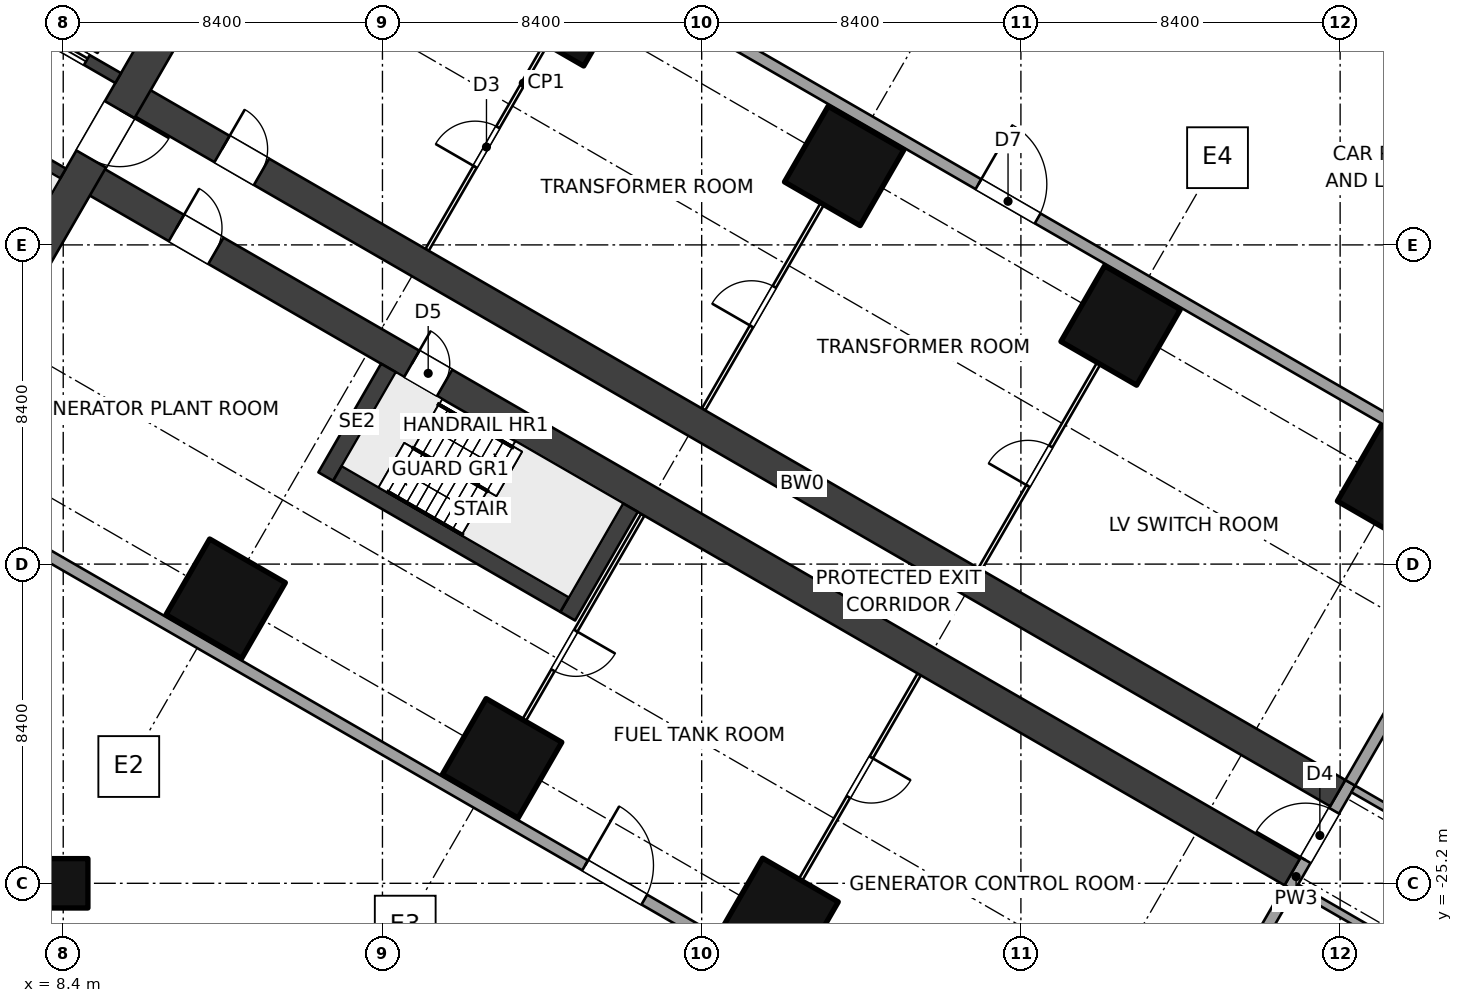
"""IFC4 building model, lengths in metres.
Left out: names, types, materials, properties, quantities, classifications, styles, units other than length and angle.
Written with IfcOpenShell. Run it as: python <this file> out.ifc"""

import sys

from ifc_helpers import new_model, si_unit, direction, frame, frame_2d, origin, origin_2d, place, context, subcontext, project, spatial, rectangle, extrude, element, fill, save


model = new_model("IFC4")
c1 = context("Model", 3, precision=1e-05, world=origin(), true_north=direction((0.0, 1.0)))
c2 = subcontext(c1, "Body", "Model", "MODEL_VIEW")
j1 = project(units=[si_unit("LENGTHUNIT", "METRE"), si_unit("PLANEANGLEUNIT", "RADIAN")], contexts=[c1])
p1 = place(None, origin())
s1 = spatial("IfcSite", under=j1, at=p1, CompositionType="ELEMENT")
p2 = place(p1, origin())
s2 = spatial("IfcBuilding", under=s1, at=p2, CompositionType="ELEMENT")
p3 = place(p2, origin())
s3 = spatial("IfcBuildingStorey", under=s2, at=p3, CompositionType="ELEMENT", Elevation=0.0)
for number, where, z_axis, x_axis in (
    (1, (21.675, -2.122, 0.0), (0.0, 0.0, 1.0), (-0.5, -0.866, 0.0)),
    (2, (12.675, -17.71, 0.0), (0.0, 0.0, 1.0), (-0.5, -0.866, 0.0)),
    (3, (28.949, -6.322, 0.0), (0.0, 0.0, 1.0), (-0.5, -0.866, 0.0)),
    (4, (19.949, -21.91, 0.0), (0.0, 0.0, 1.0), (-0.5, -0.866, 0.0)),
    (5, (36.224, -10.521, 0.0), (0.0, 0.0, 1.0), (-0.5, -0.866, 0.0)),
    (6, (27.224, -26.11, 0.0), (0.0, 0.0, 1.0), (-0.5, -0.866, 0.0)),
    (7, (43.499, -14.721, 0.0), (0.0, 0.0, 1.0), (-0.5, -0.866, 0.0)),
):
    element("IfcColumn", number, at=place(p3, frame(where, z_axis=z_axis, x_axis=x_axis)), inside=s3, PredefinedType="COLUMN", context=c2, shape_type="SweptSolid", body=[
        extrude(rectangle(XDim=2.3, YDim=2.3, at=origin_2d()), origin(), (0.0, 0.0, 1.0), 6.0),
    ])
p4 = place(p3, frame((8.4, -25.2, 0.0), z_axis=(0.0, 0.0, 1.0), x_axis=(1.0, 0.0, 0.0)))
e8 = element("IfcColumn", 8, at=p4, inside=s3, PredefinedType="COLUMN", context=c2, shape_type="SweptSolid", body=[
    extrude(rectangle(XDim=1.3, YDim=1.3, at=origin_2d()), origin(), (0.0, 0.0, 1.0), 6.0),
])
p5 = place(p3, frame((12.551, -0.225, 0.0), z_axis=(0.0, 0.0, 1.0), x_axis=(-0.499997612506, -0.8660267822, 0.0)))
e9 = element("IfcWall", 9, at=p5, inside=s3, PredefinedType="SHEAR", context=c2, shape_type="SweptSolid", body=[
    extrude(rectangle(XDim=12.161, YDim=0.9, at=frame_2d((6.08, 0.0))), origin(), (0.0, 0.0, 1.0), 6.0),
])
p6 = place(p5, frame((5.33, 0.0, 0.0)))
e10 = element("IfcOpeningElement", 10, at=p6, cuts=e9, PredefinedType="OPENING", context=c2, shape_type="SweptSolid", body=[
    extrude(rectangle(XDim=1.5, YDim=2.1, at=frame_2d((0.75, 1.05))), frame((0.0, 0.46, 0.0), z_axis=(0.0, -1.0, 0.0), x_axis=(1.0, 0.0, 0.0)), (0.0, 0.0, 1.0), 0.92),
])
p7 = place(p3, frame((2.419, -3.071, 0.0), z_axis=(0.0, 0.0, 1.0), x_axis=(0.86602711848, -0.499997030048, 0.0)))
e11 = element("IfcWall", 11, at=p7, inside=s3, PredefinedType="SHEAR", context=c2, shape_type="SweptSolid", body=[
    extrude(rectangle(XDim=6.901, YDim=0.3, at=frame_2d((3.451, 0.0))), origin(), (0.0, 0.0, 1.0), 6.0),
])
p8 = place(p7, frame((0.25, 0.0, 0.0)))
e12 = element("IfcOpeningElement", 12, at=p8, cuts=e11, PredefinedType="OPENING", context=c2, shape_type="SweptSolid", body=[
    extrude(rectangle(XDim=1.0, YDim=2.1, at=frame_2d((0.5, 1.05))), frame((0.0, 0.16, 0.0), z_axis=(0.0, -1.0, 0.0), x_axis=(1.0, 0.0, 0.0)), (0.0, 0.0, 1.0), 0.32),
])
p9 = place(p3, frame((3.869, -0.559, 0.0), z_axis=(0.0, 0.0, 1.0), x_axis=(0.86602711848, -0.499997030048, 0.0)))
e13 = element("IfcWall", 13, at=p9, inside=s3, PredefinedType="SHEAR", context=c2, shape_type="SweptSolid", body=[
    extrude(rectangle(XDim=6.901, YDim=0.3, at=frame_2d((3.451, 0.0))), origin(), (0.0, 0.0, 1.0), 6.0),
])
p10 = place(p9, frame((4.85, 0.0, 0.0)))
e14 = element("IfcOpeningElement", 14, at=p10, cuts=e13, PredefinedType="OPENING", context=c2, shape_type="SweptSolid", body=[
    extrude(rectangle(XDim=1.1, YDim=2.1, at=frame_2d((0.55, 1.05))), frame((0.0, 0.16, 0.0), z_axis=(0.0, -1.0, 0.0), x_axis=(1.0, 0.0, 0.0)), (0.0, 0.0, 1.0), 0.32),
])
p11 = place(p3, frame((10.11, -4.451, 0.0), z_axis=(0.0, 0.0, 1.0), x_axis=(0.866025284237, -0.500000207062, 0.0)))
e15 = element("IfcWall", 15, at=p11, inside=s3, PredefinedType="SHEAR", context=c2, shape_type="SweptSolid", body=[
    extrude(rectangle(XDim=36.75, YDim=0.8, at=frame_2d((18.375, 0.0))), origin(), (0.0, 0.0, 1.0), 6.0),
])
p12 = place(p11, frame((2.85, 0.0, 0.0)))
e16 = element("IfcOpeningElement", 16, at=p12, cuts=e15, PredefinedType="OPENING", context=c2, shape_type="SweptSolid", body=[
    extrude(rectangle(XDim=1.2, YDim=2.1, at=frame_2d((0.6, 1.05))), frame((0.0, 0.41, 0.0), z_axis=(0.0, -1.0, 0.0), x_axis=(1.0, 0.0, 0.0)), (0.0, 0.0, 1.0), 0.82),
])
p13 = place(p3, frame((8.91, -6.53, 0.0), z_axis=(0.0, 0.0, 1.0), x_axis=(0.866025284237, -0.500000207062, 0.0)))
e17 = element("IfcWall", 17, at=p13, inside=s3, PredefinedType="SHEAR", context=c2, shape_type="SweptSolid", body=[
    extrude(rectangle(XDim=36.75, YDim=0.8, at=frame_2d((18.375, 0.0))), origin(), (0.0, 0.0, 1.0), 6.0),
])
p14 = place(p13, frame((10.0, 0.0, 0.0)))
e18 = element("IfcOpeningElement", 18, at=p14, cuts=e17, PredefinedType="OPENING", context=c2, shape_type="SweptSolid", body=[
    extrude(rectangle(XDim=1.0, YDim=2.1, at=frame_2d((0.5, 1.05))), frame((0.0, 0.41, 0.0), z_axis=(0.0, -1.0, 0.0), x_axis=(1.0, 0.0, 0.0)), (0.0, 0.0, 1.0), 0.82),
])
p15 = place(p13, frame((2.85, 0.0, 0.0)))
e19 = element("IfcOpeningElement", 19, at=p15, cuts=e17, PredefinedType="OPENING", context=c2, shape_type="SweptSolid", body=[
    extrude(rectangle(XDim=1.2, YDim=2.1, at=frame_2d((0.6, 1.05))), frame((0.0, 0.41, 0.0), z_axis=(0.0, -1.0, 0.0), x_axis=(1.0, 0.0, 0.0)), (0.0, 0.0, 1.0), 0.82),
])
p16 = place(p3, frame((17.975, -8.53, 0.0), z_axis=(0.0, 0.0, 1.0), x_axis=(0.500004234368, 0.866022959057, 0.0)))
e20 = element("IfcWall", 20, at=p16, inside=s3, PredefinedType="PARTITIONING", context=c2, shape_type="SweptSolid", body=[
    extrude(rectangle(XDim=6.25, YDim=0.1, at=frame_2d((3.125, 0.0))), origin(), (0.0, 0.0, 1.0), 3.9),
])
p17 = place(p16, frame((2.525, 0.0, 0.0)))
e21 = element("IfcOpeningElement", 21, at=p17, cuts=e20, PredefinedType="OPENING", context=c2, shape_type="SweptSolid", body=[
    extrude(rectangle(XDim=1.2, YDim=2.1, at=frame_2d((0.6, 1.05))), frame((0.0, 0.06, 0.0), z_axis=(0.0, -1.0, 0.0), x_axis=(1.0, 0.0, 0.0)), (0.0, 0.0, 1.0), 0.12),
])
p18 = place(p3, frame((25.249, -12.73, 0.0), z_axis=(0.0, 0.0, 1.0), x_axis=(0.499987320047, 0.866032724435, 0.0)))
e22 = element("IfcWall", 22, at=p18, inside=s3, PredefinedType="PARTITIONING", context=c2, shape_type="SweptSolid", body=[
    extrude(rectangle(XDim=6.25, YDim=0.1, at=frame_2d((3.125, 0.0))), origin(), (0.0, 0.0, 1.0), 3.9),
])
p19 = place(p18, frame((2.525, 0.0, 0.0)))
e23 = element("IfcOpeningElement", 23, at=p19, cuts=e22, PredefinedType="OPENING", context=c2, shape_type="SweptSolid", body=[
    extrude(rectangle(XDim=1.2, YDim=2.1, at=frame_2d((0.6, 1.05))), frame((0.0, 0.06, 0.0), z_axis=(0.0, -1.0, 0.0), x_axis=(1.0, 0.0, 0.0)), (0.0, 0.0, 1.0), 0.12),
])
p20 = place(p3, frame((32.524, -16.93, 0.0), z_axis=(0.0, 0.0, 1.0), x_axis=(0.500004234368, 0.866022959057, 0.0)))
e24 = element("IfcWall", 24, at=p20, inside=s3, PredefinedType="PARTITIONING", context=c2, shape_type="SweptSolid", body=[
    extrude(rectangle(XDim=6.25, YDim=0.1, at=frame_2d((3.125, 0.0))), origin(), (0.0, 0.0, 1.0), 3.9),
])
p21 = place(p20, frame((2.525, 0.0, 0.0)))
e25 = element("IfcOpeningElement", 25, at=p21, cuts=e24, PredefinedType="OPENING", context=c2, shape_type="SweptSolid", body=[
    extrude(rectangle(XDim=1.2, YDim=2.1, at=frame_2d((0.6, 1.05))), frame((0.0, 0.06, 0.0), z_axis=(0.0, -1.0, 0.0), x_axis=(1.0, 0.0, 0.0)), (0.0, 0.0, 1.0), 0.12),
])
p22 = place(p3, frame((23.649, -15.501, 0.0), z_axis=(0.0, 0.0, 1.0), x_axis=(-0.500004234368, -0.866022959057, 0.0)))
e26 = element("IfcWall", 26, at=p22, inside=s3, PredefinedType="PARTITIONING", context=c2, shape_type="SweptSolid", body=[
    extrude(rectangle(XDim=6.25, YDim=0.1, at=frame_2d((3.125, 0.0))), origin(), (0.0, 0.0, 1.0), 3.9),
])
p23 = place(p22, frame((3.525, 0.0, 0.0)))
e27 = element("IfcOpeningElement", 27, at=p23, cuts=e26, PredefinedType="OPENING", context=c2, shape_type="SweptSolid", body=[
    extrude(rectangle(XDim=1.2, YDim=2.1, at=frame_2d((0.6, 1.05))), frame((0.0, 0.06, 0.0), z_axis=(0.0, -1.0, 0.0), x_axis=(1.0, 0.0, 0.0)), (0.0, 0.0, 1.0), 0.12),
])
p24 = place(p3, frame((30.924, -19.701, 0.0), z_axis=(0.0, 0.0, 1.0), x_axis=(-0.500004234368, -0.866022959057, 0.0)))
e28 = element("IfcWall", 28, at=p24, inside=s3, PredefinedType="PARTITIONING", context=c2, shape_type="SweptSolid", body=[
    extrude(rectangle(XDim=6.25, YDim=0.1, at=frame_2d((3.125, 0.0))), origin(), (0.0, 0.0, 1.0), 3.9),
])
p25 = place(p24, frame((2.525, 0.0, 0.0)))
e29 = element("IfcOpeningElement", 29, at=p25, cuts=e28, PredefinedType="OPENING", context=c2, shape_type="SweptSolid", body=[
    extrude(rectangle(XDim=1.2, YDim=2.1, at=frame_2d((0.6, 1.05))), frame((0.0, 0.06, 0.0), z_axis=(0.0, -1.0, 0.0), x_axis=(1.0, 0.0, 0.0)), (0.0, 0.0, 1.0), 0.12),
])
p26 = place(p3, frame((40.667, -25.326, 0.0), z_axis=(0.0, 0.0, 1.0), x_axis=(0.499971222258, 0.866042017984, 0.0)))
e30 = element("IfcWall", 30, at=p26, inside=s3, PredefinedType="SOLIDWALL", context=c2, shape_type="SweptSolid", body=[
    extrude(rectangle(XDim=3.2, YDim=0.3, at=frame_2d((1.6, 0.0))), origin(), (0.0, 0.0, 1.0), 5.7),
])
p27 = place(p26, frame((0.85, 0.0, 0.0)))
e31 = element("IfcOpeningElement", 31, at=p27, cuts=e30, PredefinedType="OPENING", context=c2, shape_type="SweptSolid", body=[
    extrude(rectangle(XDim=1.5, YDim=2.1, at=frame_2d((0.75, 1.05))), frame((0.0, 0.16, 0.0), z_axis=(0.0, -1.0, 0.0), x_axis=(1.0, 0.0, 0.0)), (0.0, 0.0, 1.0), 0.32),
])
p28 = place(p3, frame((42.346, -22.717, 0.0), z_axis=(0.0, 0.0, 1.0), x_axis=(0.866038004836, -0.499978173704, 0.0)))
e32 = element("IfcWall", 32, at=p28, inside=s3, PredefinedType="SOLIDWALL", context=c2, shape_type="SweptSolid", body=[
    extrude(rectangle(XDim=8.953, YDim=0.2, at=frame_2d((4.477, 0.0))), origin(), (0.0, 0.0, 1.0), 5.7),
])
p29 = place(p3, frame((40.846, -25.315, 0.0), z_axis=(0.0, 0.0, 1.0), x_axis=(0.866028443642, -0.499994734776, 0.0)))
e33 = element("IfcWall", 33, at=p29, inside=s3, PredefinedType="SOLIDWALL", context=c2, shape_type="SweptSolid", body=[
    extrude(rectangle(XDim=10.685, YDim=0.2, at=frame_2d((5.343, 0.0))), origin(), (0.0, 0.0, 1.0), 5.7),
])
p30 = place(p29, frame((4.593, 0.0, 0.0)))
e34 = element("IfcOpeningElement", 34, at=p30, cuts=e33, PredefinedType="OPENING", context=c2, shape_type="SweptSolid", body=[
    extrude(rectangle(XDim=1.5, YDim=2.1, at=frame_2d((0.75, 1.05))), frame((0.0, 0.11, 0.0), z_axis=(0.0, -1.0, 0.0), x_axis=(1.0, 0.0, 0.0)), (0.0, 0.0, 1.0), 0.22),
])
for number, where, z_axis, x_axis in (
    (35, (42.267, -22.555, 0.0), (0.0, 0.0, 1.0), (0.5, 0.866, 0.0)),
    (36, (40.667, -25.326, 0.0), (0.0, 0.0, 1.0), (-0.5, -0.866, 0.0)),
):
    element("IfcWall", number, at=place(p3, frame(where, z_axis=z_axis, x_axis=x_axis)), inside=s3, PredefinedType="SOLIDWALL", context=c2, shape_type="SweptSolid", body=[
        extrude(rectangle(XDim=8.6, YDim=0.3, at=frame_2d((4.3, 0.0))), origin(), (0.0, 0.0, 1.0), 4.1),
    ])
p31 = place(p3, frame((9.45, 6.495, 0.0), z_axis=(0.0, 0.0, 1.0), x_axis=(0.866025301493, -0.500000177174, 0.0)))
e37 = element("IfcWall", 37, at=p31, inside=s3, PredefinedType="SOLIDWALL", context=c2, shape_type="SweptSolid", body=[
    extrude(rectangle(XDim=43.095, YDim=0.3, at=frame_2d((21.548, 0.0))), origin(), (0.0, 0.0, 1.0), 5.7),
])
p32 = place(p31, frame((26.595, 0.0, 0.0)))
e38 = element("IfcOpeningElement", 38, at=p32, cuts=e37, PredefinedType="OPENING", context=c2, shape_type="SweptSolid", body=[
    extrude(rectangle(XDim=1.8, YDim=2.4, at=frame_2d((0.9, 1.2))), frame((0.0, 0.16, 0.0), z_axis=(0.0, -1.0, 0.0), x_axis=(1.0, 0.0, 0.0)), (0.0, 0.0, 1.0), 0.32),
])
p33 = place(p3, frame((-0.9, -11.432, 0.0), z_axis=(0.0, 0.0, 1.0), x_axis=(0.866025301493, -0.500000177174, 0.0)))
e39 = element("IfcWall", 39, at=p33, inside=s3, PredefinedType="SOLIDWALL", context=c2, shape_type="SweptSolid", body=[
    extrude(rectangle(XDim=43.095, YDim=0.3, at=frame_2d((21.548, 0.0))), origin(), (0.0, 0.0, 1.0), 5.7),
])
p34 = place(p33, frame((26.595, 0.0, 0.0)))
e40 = element("IfcOpeningElement", 40, at=p34, cuts=e39, PredefinedType="OPENING", context=c2, shape_type="SweptSolid", body=[
    extrude(rectangle(XDim=1.8, YDim=2.4, at=frame_2d((0.9, 1.2))), frame((0.0, 0.16, 0.0), z_axis=(0.0, -1.0, 0.0), x_axis=(1.0, 0.0, 0.0)), (0.0, 0.0, 1.0), 0.32),
])
for number, where, z_axis, x_axis in (
    (41, (16.959, -11.639, 0.0), (0.0, 0.0, 1.0), (-0.5, -0.866, 0.0)),
    (42, (23.324, -15.314, 0.0), (0.0, 0.0, 1.0), (-0.5, -0.866, 0.0)),
):
    element("IfcWall", number, at=place(p3, frame(where, z_axis=z_axis, x_axis=x_axis)), inside=s3, PredefinedType="SOLIDWALL", context=c2, shape_type="SweptSolid", body=[
        extrude(rectangle(XDim=3.3, YDim=0.45, at=frame_2d((1.65, 0.0))), origin(), (0.0, 0.0, 1.0), 6.0),
    ])
p35 = place(p3, frame((15.616, -14.415, 0.0), z_axis=(0.0, 0.0, 1.0), x_axis=(0.866028853923, -0.499994024137, 0.0)))
e43 = element("IfcWall", 43, at=p35, inside=s3, PredefinedType="SOLIDWALL", context=c2, shape_type="SweptSolid", body=[
    extrude(rectangle(XDim=6.9, YDim=0.45, at=frame_2d((3.45, 0.0))), origin(), (0.0, 0.0, 1.0), 6.0),
])
p36 = place(p10, origin())
e44 = element("IfcDoor", 44, at=p36, inside=s3, OperationType="DOUBLE_DOOR_SLIDING", PredefinedType="DOOR", context=c2, shape_type="SweptSolid", body=[
    extrude(rectangle(XDim=1.1, YDim=2.1, at=frame_2d((0.55, 1.05))), frame((0.0, 0.025, 0.0), z_axis=(0.0, -1.0, 0.0), x_axis=(1.0, 0.0, 0.0)), (0.0, 0.0, 1.0), 0.05),
])
fill(e14, e44)
p37 = place(p6, origin())
e45 = element("IfcDoor", 45, at=p37, inside=s3, OperationType="DOUBLE_DOOR_DOUBLE_SWING", PredefinedType="DOOR", context=c2, shape_type="SweptSolid", body=[
    extrude(rectangle(XDim=1.5, YDim=2.1, at=frame_2d((0.75, 1.05))), frame((0.0, 0.025, 0.0), z_axis=(0.0, -1.0, 0.0), x_axis=(1.0, 0.0, 0.0)), (0.0, 0.0, 1.0), 0.05),
])
fill(e10, e45)
p38 = place(p14, origin())
e46 = element("IfcDoor", 46, at=p38, inside=s3, OperationType="SINGLE_SWING_LEFT", PredefinedType="DOOR", context=c2, shape_type="SweptSolid", body=[
    extrude(rectangle(XDim=1.0, YDim=2.1, at=frame_2d((0.5, 1.05))), frame((0.0, 0.025, 0.0), z_axis=(0.0, -1.0, 0.0), x_axis=(1.0, 0.0, 0.0)), (0.0, 0.0, 1.0), 0.05),
])
fill(e18, e46)
p39 = place(p17, origin())
e47 = element("IfcDoor", 47, at=p39, inside=s3, OperationType="DOUBLE_SWING_LEFT", PredefinedType="DOOR", context=c2, shape_type="SweptSolid", body=[
    extrude(rectangle(XDim=1.2, YDim=2.1, at=frame_2d((0.6, 1.05))), frame((0.0, 0.025, 0.0), z_axis=(0.0, -1.0, 0.0), x_axis=(1.0, 0.0, 0.0)), (0.0, 0.0, 1.0), 0.05),
])
fill(e21, e47)
p40 = place(p19, origin())
e48 = element("IfcDoor", 48, at=p40, inside=s3, OperationType="DOUBLE_SWING_LEFT", PredefinedType="DOOR", context=c2, shape_type="SweptSolid", body=[
    extrude(rectangle(XDim=1.2, YDim=2.1, at=frame_2d((0.6, 1.05))), frame((0.0, 0.025, 0.0), z_axis=(0.0, -1.0, 0.0), x_axis=(1.0, 0.0, 0.0)), (0.0, 0.0, 1.0), 0.05),
])
fill(e23, e48)
p41 = place(p21, origin())
e49 = element("IfcDoor", 49, at=p41, inside=s3, OperationType="DOUBLE_SWING_LEFT", PredefinedType="DOOR", context=c2, shape_type="SweptSolid", body=[
    extrude(rectangle(XDim=1.2, YDim=2.1, at=frame_2d((0.6, 1.05))), frame((0.0, 0.025, 0.0), z_axis=(0.0, -1.0, 0.0), x_axis=(1.0, 0.0, 0.0)), (0.0, 0.0, 1.0), 0.05),
])
fill(e25, e49)
p42 = place(p12, origin())
e50 = element("IfcDoor", 50, at=p42, inside=s3, OperationType="DOUBLE_SWING_LEFT", PredefinedType="DOOR", context=c2, shape_type="SweptSolid", body=[
    extrude(rectangle(XDim=1.2, YDim=2.1, at=frame_2d((0.6, 1.05))), frame((0.0, 0.025, 0.0), z_axis=(0.0, -1.0, 0.0), x_axis=(1.0, 0.0, 0.0)), (0.0, 0.0, 1.0), 0.05),
])
fill(e16, e50)
p43 = place(p23, origin())
e51 = element("IfcDoor", 51, at=p43, inside=s3, OperationType="DOUBLE_SWING_LEFT", PredefinedType="DOOR", context=c2, shape_type="SweptSolid", body=[
    extrude(rectangle(XDim=1.2, YDim=2.1, at=frame_2d((0.6, 1.05))), frame((0.0, 0.025, 0.0), z_axis=(0.0, -1.0, 0.0), x_axis=(1.0, 0.0, 0.0)), (0.0, 0.0, 1.0), 0.05),
])
fill(e27, e51)
p44 = place(p25, origin())
e52 = element("IfcDoor", 52, at=p44, inside=s3, OperationType="DOUBLE_SWING_LEFT", PredefinedType="DOOR", context=c2, shape_type="SweptSolid", body=[
    extrude(rectangle(XDim=1.2, YDim=2.1, at=frame_2d((0.6, 1.05))), frame((0.0, 0.025, 0.0), z_axis=(0.0, -1.0, 0.0), x_axis=(1.0, 0.0, 0.0)), (0.0, 0.0, 1.0), 0.05),
])
fill(e29, e52)
p45 = place(p15, origin())
e53 = element("IfcDoor", 53, at=p45, inside=s3, OperationType="DOUBLE_SWING_LEFT", PredefinedType="DOOR", context=c2, shape_type="SweptSolid", body=[
    extrude(rectangle(XDim=1.2, YDim=2.1, at=frame_2d((0.6, 1.05))), frame((0.0, 0.025, 0.0), z_axis=(0.0, -1.0, 0.0), x_axis=(1.0, 0.0, 0.0)), (0.0, 0.0, 1.0), 0.05),
])
fill(e19, e53)
p46 = place(p27, origin())
e54 = element("IfcDoor", 54, at=p46, inside=s3, OperationType="DOUBLE_DOOR_DOUBLE_SWING", PredefinedType="DOOR", context=c2, shape_type="SweptSolid", body=[
    extrude(rectangle(XDim=1.5, YDim=2.1, at=frame_2d((0.75, 1.05))), frame((0.0, 0.025, 0.0), z_axis=(0.0, -1.0, 0.0), x_axis=(1.0, 0.0, 0.0)), (0.0, 0.0, 1.0), 0.05),
])
fill(e31, e54)
p47 = place(p32, origin())
e55 = element("IfcDoor", 55, at=p47, inside=s3, OperationType="DOUBLE_DOOR_DOUBLE_SWING", PredefinedType="DOOR", context=c2, shape_type="SweptSolid", body=[
    extrude(rectangle(XDim=1.8, YDim=2.4, at=frame_2d((0.9, 1.2))), frame((0.0, 0.025, 0.0), z_axis=(0.0, -1.0, 0.0), x_axis=(1.0, 0.0, 0.0)), (0.0, 0.0, 1.0), 0.05),
])
fill(e38, e55)
p48 = place(p34, origin())
e56 = element("IfcDoor", 56, at=p48, inside=s3, OperationType="DOUBLE_DOOR_DOUBLE_SWING", PredefinedType="DOOR", context=c2, shape_type="SweptSolid", body=[
    extrude(rectangle(XDim=1.8, YDim=2.4, at=frame_2d((0.9, 1.2))), frame((0.0, 0.025, 0.0), z_axis=(0.0, -1.0, 0.0), x_axis=(1.0, 0.0, 0.0)), (0.0, 0.0, 1.0), 0.05),
])
fill(e40, e56)
save(model, sys.argv[1])
